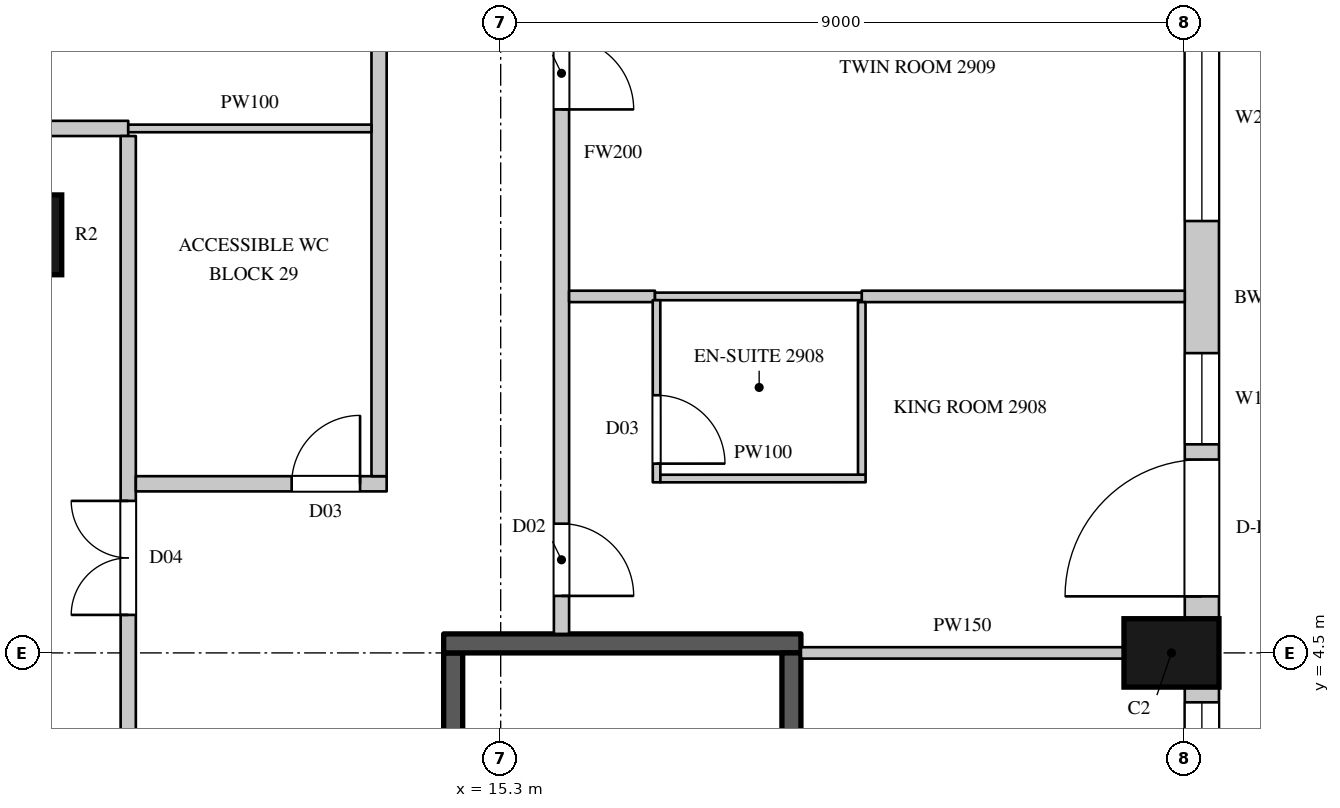
"""IFC4 building model, lengths in metres.
Left out: names, types, materials, properties, quantities, classifications, styles, units other than length and angle.
Written with IfcOpenShell. Run it as: python <this file> out.ifc"""

import sys

from ifc_helpers import new_model, si_unit, direction, frame, frame_2d, origin, origin_2d, place, context, subcontext, project, spatial, rectangle, circle, extrude, element, fill, save


model = new_model("IFC4")
c1 = context("Model", 3, precision=1e-05, world=origin(), true_north=direction((0.0, 1.0)))
c2 = subcontext(c1, "Body", "Model", "MODEL_VIEW")
j1 = project(units=[si_unit("LENGTHUNIT", "METRE"), si_unit("PLANEANGLEUNIT", "RADIAN")], contexts=[c1])
p1 = place(None, origin())
s1 = spatial("IfcSite", under=j1, at=p1, CompositionType="ELEMENT")
p2 = place(p1, origin())
s2 = spatial("IfcBuilding", under=s1, at=p2, CompositionType="ELEMENT")
p3 = place(p2, frame((0.0, 0.0, 134.7)))
s3 = spatial("IfcBuildingStorey", under=s2, at=p3, CompositionType="ELEMENT", Elevation=134.7)
p4 = place(p3, frame((24.125, 4.5, 0.0), z_axis=(0.0, 0.0, 1.0), x_axis=(0.0, 1.0, 0.0)))
e1 = element("IfcColumn", 1, at=p4, inside=s3, PredefinedType="COLUMN", context=c2, shape_type="SweptSolid", body=[
    extrude(rectangle(XDim=0.9, YDim=1.25, at=origin_2d()), origin(), (0.0, 0.0, 1.0), 3.6),
])
p5 = place(p3, frame((9.0, 10.0, 0.0), z_axis=(0.0, 0.0, 1.0), x_axis=(1.0, 0.0, 0.0)))
e2 = element("IfcColumn", 2, at=p5, inside=s3, PredefinedType="COLUMN", context=c2, shape_type="SweptSolid", body=[
    extrude(circle(Radius=0.525, at=origin_2d()), origin(), (0.0, 0.0, 1.0), 3.6),
])
p6 = place(p3, frame((24.525, -4.05, 0.0), z_axis=(0.0, 0.0, 1.0), x_axis=(0.0, 1.0, 0.0)))
e3 = element("IfcWall", 3, at=p6, inside=s3, PredefinedType="SOLIDWALL", context=c2, shape_type="SweptSolid", body=[
    extrude(rectangle(XDim=8.1, YDim=0.45, at=frame_2d((4.05, 0.0))), origin(), (0.0, 0.0, 1.0), 3.3),
])
p7 = place(p6, frame((0.2, 0.0, 0.0)))
e4 = element("IfcOpeningElement", 4, at=p7, cuts=e3, PredefinedType="OPENING", context=c2, shape_type="SweptSolid", body=[
    extrude(rectangle(XDim=1.8, YDim=2.4, at=frame_2d((0.9, 1.2))), frame((0.0, 0.235, 0.0), z_axis=(0.0, -1.0, 0.0), x_axis=(1.0, 0.0, 0.0)), (0.0, 0.0, 1.0), 0.47),
])
p8 = place(p6, frame((2.2, 0.0, 1.05)))
e5 = element("IfcOpeningElement", 5, at=p8, cuts=e3, PredefinedType="OPENING", context=c2, shape_type="SweptSolid", body=[
    extrude(rectangle(XDim=1.2, YDim=2.0, at=frame_2d((0.6, 1.0))), frame((0.0, 0.235, 0.0), z_axis=(0.0, -1.0, 0.0), x_axis=(1.0, 0.0, 0.0)), (0.0, 0.0, 1.0), 0.47),
])
p9 = place(p6, frame((4.7, 0.0, 0.0)))
e6 = element("IfcOpeningElement", 6, at=p9, cuts=e3, PredefinedType="OPENING", context=c2, shape_type="SweptSolid", body=[
    extrude(rectangle(XDim=1.8, YDim=2.4, at=frame_2d((0.9, 1.2))), frame((0.0, 0.235, 0.0), z_axis=(0.0, -1.0, 0.0), x_axis=(1.0, 0.0, 0.0)), (0.0, 0.0, 1.0), 0.47),
])
p10 = place(p6, frame((6.7, 0.0, 1.05)))
e7 = element("IfcOpeningElement", 7, at=p10, cuts=e3, PredefinedType="OPENING", context=c2, shape_type="SweptSolid", body=[
    extrude(rectangle(XDim=1.2, YDim=2.0, at=frame_2d((0.6, 1.0))), frame((0.0, 0.235, 0.0), z_axis=(0.0, -1.0, 0.0), x_axis=(1.0, 0.0, 0.0)), (0.0, 0.0, 1.0), 0.47),
])
p11 = place(p3, frame((24.525, 4.95, 0.0), z_axis=(0.0, 0.0, 1.0), x_axis=(0.0, 1.0, 0.0)))
e8 = element("IfcWall", 8, at=p11, inside=s3, PredefinedType="SOLIDWALL", context=c2, shape_type="SweptSolid", body=[
    extrude(rectangle(XDim=8.439, YDim=0.45, at=frame_2d((4.219, 0.0))), origin(), (0.0, 0.0, 1.0), 3.3),
])
p12 = place(p11, frame((0.294, 0.0, 0.0)))
e9 = element("IfcOpeningElement", 9, at=p12, cuts=e8, PredefinedType="OPENING", context=c2, shape_type="SweptSolid", body=[
    extrude(rectangle(XDim=1.8, YDim=2.4, at=frame_2d((0.9, 1.2))), frame((0.0, 0.235, 0.0), z_axis=(0.0, -1.0, 0.0), x_axis=(1.0, 0.0, 0.0)), (0.0, 0.0, 1.0), 0.47),
])
p13 = place(p11, frame((2.294, 0.0, 1.05)))
e10 = element("IfcOpeningElement", 10, at=p13, cuts=e8, PredefinedType="OPENING", context=c2, shape_type="SweptSolid", body=[
    extrude(rectangle(XDim=1.2, YDim=2.0, at=frame_2d((0.6, 1.0))), frame((0.0, 0.235, 0.0), z_axis=(0.0, -1.0, 0.0), x_axis=(1.0, 0.0, 0.0)), (0.0, 0.0, 1.0), 0.47),
])
p14 = place(p11, frame((5.232, 0.0, 1.05)))
e11 = element("IfcOpeningElement", 11, at=p14, cuts=e8, PredefinedType="OPENING", context=c2, shape_type="SweptSolid", body=[
    extrude(rectangle(XDim=2.7, YDim=2.0, at=frame_2d((1.35, 1.0))), frame((0.0, 0.235, 0.0), z_axis=(0.0, -1.0, 0.0), x_axis=(1.0, 0.0, 0.0)), (0.0, 0.0, 1.0), 0.47),
])
p15 = place(p3, frame((-8.3, 11.4, 0.0), z_axis=(0.0, 0.0, 1.0), x_axis=(1.0, 0.0, 0.0)))
e12 = element("IfcWall", 12, at=p15, inside=s3, PredefinedType="PARTITIONING", context=c2, shape_type="SweptSolid", body=[
    extrude(rectangle(XDim=18.7, YDim=0.2, at=frame_2d((9.35, 0.0))), origin(), (0.0, 0.0, 1.0), 3.3),
])
p16 = place(p15, frame((6.9, 0.0, 0.0)))
e13 = element("IfcOpeningElement", 13, at=p16, cuts=e12, PredefinedType="OPENING", context=c2, shape_type="SweptSolid", body=[
    extrude(rectangle(XDim=1.5, YDim=2.2, at=frame_2d((0.75, 1.1))), frame((0.0, 0.11, 0.0), z_axis=(0.0, -1.0, 0.0), x_axis=(1.0, 0.0, 0.0)), (0.0, 0.0, 1.0), 0.22),
])
p17 = place(p3, frame((10.4, -11.3, 0.0), z_axis=(0.0, 0.0, 1.0), x_axis=(0.0, 1.0, 0.0)))
e14 = element("IfcWall", 14, at=p17, inside=s3, PredefinedType="PARTITIONING", context=c2, shape_type="SweptSolid", body=[
    extrude(rectangle(XDim=22.6, YDim=0.2, at=frame_2d((11.3, 0.0))), origin(), (0.0, 0.0, 1.0), 3.3),
])
p18 = place(p17, frame((16.3, 0.0, 0.0)))
e15 = element("IfcOpeningElement", 15, at=p18, cuts=e14, PredefinedType="OPENING", context=c2, shape_type="SweptSolid", body=[
    extrude(rectangle(XDim=1.5, YDim=2.2, at=frame_2d((0.75, 1.1))), frame((0.0, 0.11, 0.0), z_axis=(0.0, -1.0, 0.0), x_axis=(1.0, 0.0, 0.0)), (0.0, 0.0, 1.0), 0.22),
])
p19 = place(p17, frame((9.15, 0.0, 0.0)))
e16 = element("IfcOpeningElement", 16, at=p19, cuts=e14, PredefinedType="OPENING", context=c2, shape_type="SweptSolid", body=[
    extrude(rectangle(XDim=1.5, YDim=2.2, at=frame_2d((0.75, 1.1))), frame((0.0, 0.11, 0.0), z_axis=(0.0, -1.0, 0.0), x_axis=(1.0, 0.0, 0.0)), (0.0, 0.0, 1.0), 0.22),
])
p20 = place(p3, frame((10.5, 6.725, 0.0), z_axis=(0.0, 0.0, 1.0), x_axis=(1.0, 0.0, 0.0)))
e17 = element("IfcWall", 17, at=p20, inside=s3, PredefinedType="PARTITIONING", context=c2, shape_type="SweptSolid", body=[
    extrude(rectangle(XDim=3.3, YDim=0.2, at=frame_2d((1.65, 0.0))), origin(), (0.0, 0.0, 1.0), 3.3),
])
p21 = place(p20, frame((2.05, 0.0, 0.0)))
e18 = element("IfcOpeningElement", 18, at=p21, cuts=e17, PredefinedType="OPENING", context=c2, shape_type="SweptSolid", body=[
    extrude(rectangle(XDim=0.9, YDim=2.2, at=frame_2d((0.45, 1.1))), frame((0.0, 0.11, 0.0), z_axis=(0.0, -1.0, 0.0), x_axis=(1.0, 0.0, 0.0)), (0.0, 0.0, 1.0), 0.22),
])
p22 = place(p3, frame((13.7, 6.825, 0.0), z_axis=(0.0, 0.0, 1.0), x_axis=(0.0, 1.0, 0.0)))
e19 = element("IfcWall", 19, at=p22, inside=s3, PredefinedType="PARTITIONING", context=c2, shape_type="SweptSolid", body=[
    extrude(rectangle(XDim=8.175, YDim=0.2, at=frame_2d((4.087, 0.0))), origin(), (0.0, 0.0, 1.0), 3.3),
])
p23 = place(p3, frame((16.1, 4.75, 0.0), z_axis=(0.0, 0.0, 1.0), x_axis=(0.0, 1.0, 0.0)))
e20 = element("IfcWall", 20, at=p23, inside=s3, PredefinedType="PARTITIONING", context=c2, shape_type="SweptSolid", body=[
    extrude(rectangle(XDim=12.65, YDim=0.2, at=frame_2d((6.325, 0.0))), origin(), (0.0, 0.0, 1.0), 3.3),
])
p24 = place(p23, frame((0.5, 0.0, 0.0)))
e21 = element("IfcOpeningElement", 21, at=p24, cuts=e20, PredefinedType="OPENING", context=c2, shape_type="SweptSolid", body=[
    extrude(rectangle(XDim=0.95, YDim=2.2, at=frame_2d((0.475, 1.1))), frame((0.0, 0.11, 0.0), z_axis=(0.0, -1.0, 0.0), x_axis=(1.0, 0.0, 0.0)), (0.0, 0.0, 1.0), 0.22),
])
p25 = place(p23, frame((6.9, 0.0, 0.0)))
e22 = element("IfcOpeningElement", 22, at=p25, cuts=e20, PredefinedType="OPENING", context=c2, shape_type="SweptSolid", body=[
    extrude(rectangle(XDim=0.95, YDim=2.2, at=frame_2d((0.475, 1.1))), frame((0.0, 0.11, 0.0), z_axis=(0.0, -1.0, 0.0), x_axis=(1.0, 0.0, 0.0)), (0.0, 0.0, 1.0), 0.22),
])
p26 = place(p3, frame((16.2, 9.19, 0.0), z_axis=(0.0, 0.0, 1.0), x_axis=(1.0, 0.0, 0.0)))
e23 = element("IfcWall", 23, at=p26, inside=s3, PredefinedType="PARTITIONING", context=c2, shape_type="SweptSolid", body=[
    extrude(rectangle(XDim=1.13, YDim=0.15, at=frame_2d((0.565, 0.0))), origin(), (0.0, 0.0, 1.0), 2.65),
])
p27 = place(p3, frame((19.25, 4.5, 0.0), z_axis=(0.0, 0.0, 1.0), x_axis=(1.0, 0.0, 0.0)))
e24 = element("IfcWall", 24, at=p27, inside=s3, PredefinedType="PARTITIONING", context=c2, shape_type="SweptSolid", body=[
    extrude(rectangle(XDim=4.25, YDim=0.15, at=frame_2d((2.125, 0.0))), origin(), (0.0, 0.0, 1.0), 3.3),
])
p28 = place(p3, frame((20.05, 9.19, 0.0), z_axis=(0.0, 0.0, 1.0), x_axis=(1.0, 0.0, 0.0)))
e25 = element("IfcWall", 25, at=p28, inside=s3, PredefinedType="PARTITIONING", context=c2, shape_type="SweptSolid", body=[
    extrude(rectangle(XDim=4.25, YDim=0.15, at=frame_2d((2.125, 0.0))), origin(), (0.0, 0.0, 1.0), 2.65),
])
p29 = place(p3, frame((14.675, -4.5, 0.0), z_axis=(0.0, 0.0, 1.0), x_axis=(0.0, 1.0, 0.0)))
e26 = element("IfcWall", 26, at=p29, inside=s3, PredefinedType="SHEAR", context=c2, shape_type="SweptSolid", body=[
    extrude(rectangle(XDim=9.0, YDim=0.25, at=frame_2d((4.5, 0.0))), origin(), (0.0, 0.0, 1.0), 3.3),
])
p30 = place(p29, frame((0.45, 0.0, 0.0)))
e27 = element("IfcOpeningElement", 27, at=p30, cuts=e26, PredefinedType="OPENING", context=c2, shape_type="SweptSolid", body=[
    extrude(rectangle(XDim=1.1, YDim=2.2, at=frame_2d((0.55, 1.1))), frame((0.0, 0.135, 0.0), z_axis=(0.0, -1.0, 0.0), x_axis=(1.0, 0.0, 0.0)), (0.0, 0.0, 1.0), 0.27),
])
p31 = place(p3, frame((14.55, 4.625, 0.0), z_axis=(0.0, 0.0, 1.0), x_axis=(1.0, 0.0, 0.0)))
e28 = element("IfcWall", 28, at=p31, inside=s3, PredefinedType="SHEAR", context=c2, shape_type="SweptSolid", body=[
    extrude(rectangle(XDim=4.7, YDim=0.25, at=frame_2d((2.35, 0.0))), origin(), (0.0, 0.0, 1.0), 3.3),
])
p32 = place(p3, frame((19.125, -4.5, 0.0), z_axis=(0.0, 0.0, 1.0), x_axis=(0.0, 1.0, 0.0)))
e29 = element("IfcWall", 29, at=p32, inside=s3, PredefinedType="SHEAR", context=c2, shape_type="SweptSolid", body=[
    extrude(rectangle(XDim=9.0, YDim=0.25, at=frame_2d((4.5, 0.0))), origin(), (0.0, 0.0, 1.0), 3.3),
])
p33 = place(p3, frame((10.4, 11.4, 0.0), z_axis=(0.0, 0.0, 1.0), x_axis=(1.0, 0.0, 0.0)))
e30 = element("IfcWall", 30, at=p33, inside=s3, PredefinedType="PARTITIONING", context=c2, shape_type="SweptSolid", body=[
    extrude(rectangle(XDim=3.2, YDim=0.1, at=frame_2d((1.6, 0.0))), origin(), (0.0, 0.0, 1.0), 3.3),
])
p34 = place(p3, frame((17.33, 9.19, 0.0), z_axis=(0.0, 0.0, 1.0), x_axis=(1.0, 0.0, 0.0)))
e31 = element("IfcWall", 31, at=p34, inside=s3, PredefinedType="PARTITIONING", context=c2, shape_type="SweptSolid", body=[
    extrude(rectangle(XDim=2.72, YDim=0.1, at=frame_2d((1.36, 0.0))), origin(), (0.0, 0.0, 1.0), 2.65),
])
p35 = place(p3, frame((17.35, 9.14, 0.0), z_axis=(0.0, 0.0, 1.0), x_axis=(0.000407580973, -0.999999916939, 0.0)))
e32 = element("IfcWall", 32, at=p35, inside=s3, PredefinedType="PARTITIONING", context=c2, shape_type="SweptSolid", body=[
    extrude(rectangle(XDim=2.396, YDim=0.1, at=frame_2d((1.198, 0.0))), origin(), (0.0, 0.0, 1.0), 3.3),
])
p36 = place(p35, frame((1.25, 0.0, 0.0)))
e33 = element("IfcOpeningElement", 33, at=p36, cuts=e32, PredefinedType="OPENING", context=c2, shape_type="SweptSolid", body=[
    extrude(rectangle(XDim=0.9, YDim=2.2, at=frame_2d((0.45, 1.1))), frame((0.0, 0.06, 0.0), z_axis=(0.0, -1.0, 0.0), x_axis=(1.0, 0.0, 0.0)), (0.0, 0.0, 1.0), 0.12),
])
p37 = place(p3, frame((17.401, 6.794, 0.0), z_axis=(0.0, 0.0, 1.0), x_axis=(0.9999999346, 0.000361663629, 0.0)))
e34 = element("IfcWall", 34, at=p37, inside=s3, PredefinedType="PARTITIONING", context=c2, shape_type="SweptSolid", body=[
    extrude(rectangle(XDim=2.7, YDim=0.1, at=frame_2d((1.35, 0.0))), origin(), (0.0, 0.0, 1.0), 3.3),
])
p38 = place(p3, frame((20.05, 9.115, 0.0), z_axis=(0.0, 0.0, 1.0), x_axis=(0.000430200003, -0.999999907464, 0.0)))
e35 = element("IfcWall", 35, at=p38, inside=s3, PredefinedType="PARTITIONING", context=c2, shape_type="SweptSolid", body=[
    extrude(rectangle(XDim=2.27, YDim=0.1, at=frame_2d((1.135, 0.0))), origin(), (0.0, 0.0, 1.0), 3.3),
])
p39 = place(p10, origin())
e36 = element("IfcWindow", 36, at=p39, inside=s3, PartitioningType="SINGLE_PANEL", PredefinedType="WINDOW", context=c2, shape_type="SweptSolid", body=[
    extrude(rectangle(XDim=1.2, YDim=2.0, at=frame_2d((0.6, 1.0))), frame((0.0, 0.135, 0.0), z_axis=(0.0, -1.0, 0.0), x_axis=(1.0, 0.0, 0.0)), (0.0, 0.0, 1.0), 0.06),
])
fill(e7, e36)
p40 = place(p12, origin())
e37 = element("IfcDoor", 37, at=p40, inside=s3, OperationType="SLIDING_TO_LEFT", PredefinedType="DOOR", context=c2, shape_type="SweptSolid", body=[
    extrude(rectangle(XDim=1.8, YDim=2.4, at=frame_2d((0.9, 1.2))), frame((0.0, 0.13, 0.0), z_axis=(0.0, -1.0, 0.0), x_axis=(1.0, 0.0, 0.0)), (0.0, 0.0, 1.0), 0.05),
])
fill(e9, e37)
p41 = place(p13, origin())
e38 = element("IfcWindow", 38, at=p41, inside=s3, PartitioningType="SINGLE_PANEL", PredefinedType="WINDOW", context=c2, shape_type="SweptSolid", body=[
    extrude(rectangle(XDim=1.2, YDim=2.0, at=frame_2d((0.6, 1.0))), frame((0.0, 0.135, 0.0), z_axis=(0.0, -1.0, 0.0), x_axis=(1.0, 0.0, 0.0)), (0.0, 0.0, 1.0), 0.06),
])
fill(e10, e38)
p42 = place(p14, origin())
e39 = element("IfcWindow", 39, at=p42, inside=s3, PartitioningType="SINGLE_PANEL", PredefinedType="WINDOW", context=c2, shape_type="SweptSolid", body=[
    extrude(rectangle(XDim=2.7, YDim=2.0, at=frame_2d((1.35, 1.0))), frame((0.0, 0.135, 0.0), z_axis=(0.0, -1.0, 0.0), x_axis=(1.0, 0.0, 0.0)), (0.0, 0.0, 1.0), 0.06),
])
fill(e11, e39)
p43 = place(p18, origin())
e40 = element("IfcDoor", 40, at=p43, inside=s3, OperationType="DOUBLE_DOOR_SINGLE_SWING", PredefinedType="DOOR", context=c2, shape_type="SweptSolid", body=[
    extrude(rectangle(XDim=1.5, YDim=2.2, at=frame_2d((0.75, 1.1))), frame((0.0, 0.025, 0.0), z_axis=(0.0, -1.0, 0.0), x_axis=(1.0, 0.0, 0.0)), (0.0, 0.0, 1.0), 0.05),
])
fill(e15, e40)
p44 = place(p21, origin())
e41 = element("IfcDoor", 41, at=p44, inside=s3, OperationType="SINGLE_SWING_RIGHT", PredefinedType="DOOR", context=c2, shape_type="SweptSolid", body=[
    extrude(rectangle(XDim=0.9, YDim=2.2, at=frame_2d((0.45, 1.1))), frame((0.0, 0.025, 0.0), z_axis=(0.0, -1.0, 0.0), x_axis=(1.0, 0.0, 0.0)), (0.0, 0.0, 1.0), 0.05),
])
fill(e18, e41)
p45 = place(p24, origin())
e42 = element("IfcDoor", 42, at=p45, inside=s3, OperationType="SINGLE_SWING_RIGHT", PredefinedType="DOOR", context=c2, shape_type="SweptSolid", body=[
    extrude(rectangle(XDim=0.95, YDim=2.2, at=frame_2d((0.475, 1.1))), frame((0.0, 0.025, 0.0), z_axis=(0.0, -1.0, 0.0), x_axis=(1.0, 0.0, 0.0)), (0.0, 0.0, 1.0), 0.05),
])
fill(e21, e42)
p46 = place(p36, origin())
e43 = element("IfcDoor", 43, at=p46, inside=s3, OperationType="SINGLE_SWING_RIGHT", PredefinedType="DOOR", context=c2, shape_type="SweptSolid", body=[
    extrude(rectangle(XDim=0.9, YDim=2.2, at=frame_2d((0.45, 1.1))), frame((0.0, 0.025, 0.0), z_axis=(0.0, -1.0, 0.0), x_axis=(1.0, 0.0, 0.0)), (0.0, 0.0, 1.0), 0.05),
])
fill(e33, e43)
p47 = place(p25, origin())
e44 = element("IfcDoor", 44, at=p47, inside=s3, OperationType="SINGLE_SWING_RIGHT", PredefinedType="DOOR", context=c2, shape_type="SweptSolid", body=[
    extrude(rectangle(XDim=0.95, YDim=2.2, at=frame_2d((0.475, 1.1))), frame((0.0, 0.025, 0.0), z_axis=(0.0, -1.0, 0.0), x_axis=(1.0, 0.0, 0.0)), (0.0, 0.0, 1.0), 0.05),
])
fill(e22, e44)
save(model, sys.argv[1])
